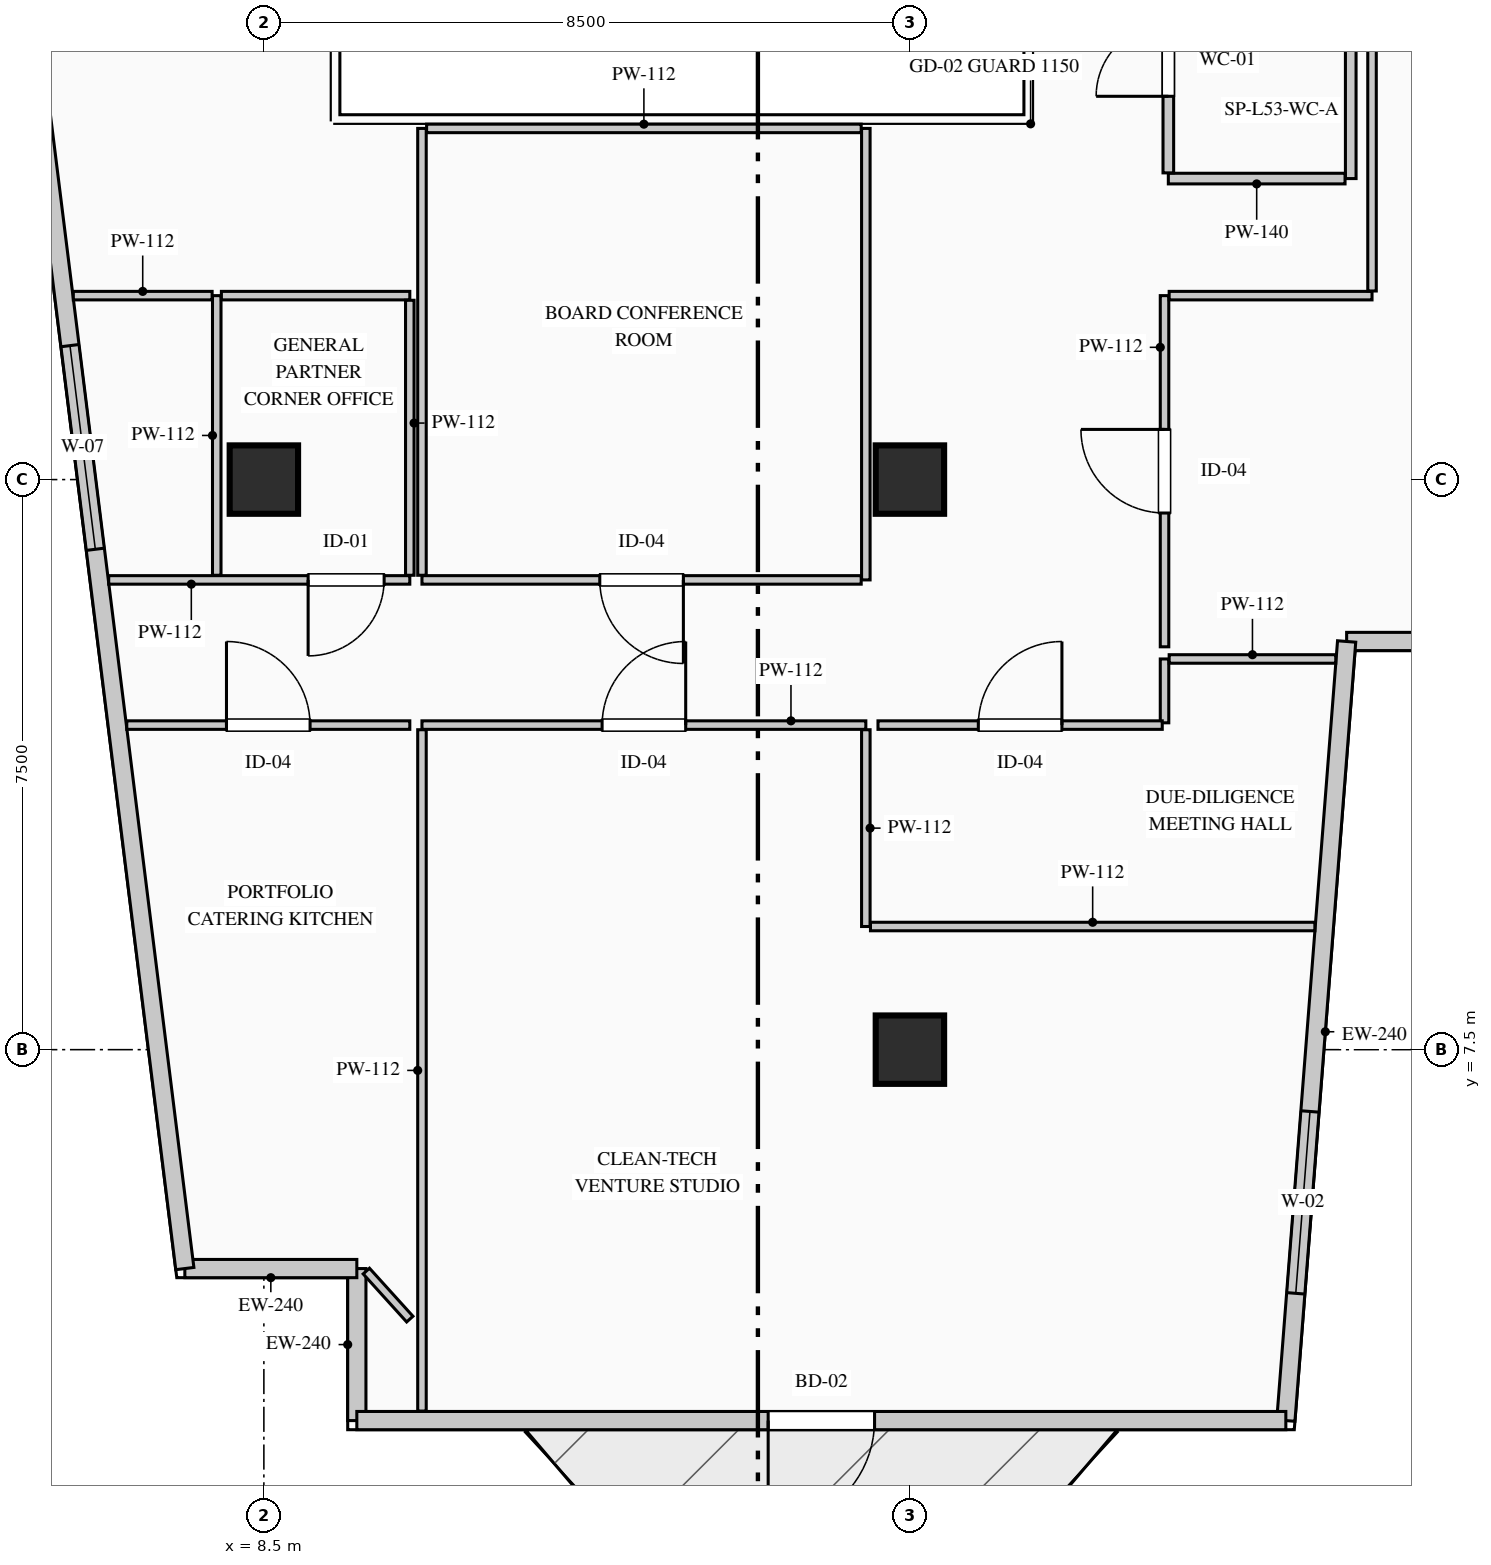
"""IFC4 building model, lengths in metres.
Left out: names, types, materials, properties, quantities, classifications, styles, units other than length and angle.
Written with IfcOpenShell. Run it as: python <this file> out.ifc"""

import sys

from ifc_helpers import new_model, si_unit, direction, frame, frame_2d, origin, origin_2d, place, context, subcontext, project, spatial, rectangle, extrude, element, fill, save


model = new_model("IFC4")
c1 = context("Model", 3, precision=1e-05, world=origin(), true_north=direction((0.0, 1.0)))
c2 = subcontext(c1, "Body", "Model", "MODEL_VIEW")
j1 = project(units=[si_unit("LENGTHUNIT", "METRE"), si_unit("PLANEANGLEUNIT", "RADIAN")], contexts=[c1])
p1 = place(None, origin())
s1 = spatial("IfcSite", under=j1, at=p1, CompositionType="ELEMENT")
p2 = place(p1, origin())
s2 = spatial("IfcBuilding", under=s1, at=p2, CompositionType="ELEMENT")
p3 = place(p2, frame((0.0, 0.0, 223.25)))
s3 = spatial("IfcBuildingStorey", under=s2, at=p3, CompositionType="ELEMENT", Elevation=223.25)
for number, where, z_axis, x_axis in (
    (1, (8.5, 15.0, 0.0), (0.0, 0.0, 1.0), (1.0, 0.0, 0.0)),
    (2, (17.0, 7.5, 0.0), (0.0, 0.0, 1.0), (1.0, 0.0, 0.0)),
    (3, (17.0, 15.0, 0.0), (0.0, 0.0, 1.0), (1.0, 0.0, 0.0)),
):
    element("IfcColumn", number, at=place(p3, frame(where, z_axis=z_axis, x_axis=x_axis)), inside=s3, PredefinedType="COLUMN", context=c2, shape_type="SweptSolid", body=[
        extrude(rectangle(XDim=0.9, YDim=0.9, at=origin_2d()), origin(), (0.0, 0.0, 1.0), 3.95),
    ])
p4 = place(p3, frame((9.723, 2.62, 0.0), z_axis=(0.0, 0.0, 1.0), x_axis=(0.0, 1.0, 0.0)))
e4 = element("IfcWall", 4, at=p4, inside=s3, PredefinedType="STANDARD", context=c2, shape_type="SweptSolid", body=[
    extrude(rectangle(XDim=2.0, YDim=0.24, at=frame_2d((1.0, 0.0))), origin(), (0.0, 0.0, 1.0), 3.7),
])
p5 = place(p3, frame((9.723, 4.62, 0.0), z_axis=(0.0, 0.0, 1.0), x_axis=(-1.0, 0.0, 0.0)))
e5 = element("IfcWall", 5, at=p5, inside=s3, PredefinedType="STANDARD", context=c2, shape_type="SweptSolid", body=[
    extrude(rectangle(XDim=2.263, YDim=0.24, at=frame_2d((1.131, 0.0))), origin(), (0.0, 0.0, 1.0), 3.7),
])
p6 = place(p3, frame((7.46, 4.62, 0.0), z_axis=(0.0, 0.0, 1.0), x_axis=(-0.123515576323, 0.992342633573, 0.0)))
e6 = element("IfcWall", 6, at=p6, inside=s3, PredefinedType="STANDARD", context=c2, shape_type="SweptSolid", body=[
    extrude(rectangle(XDim=37.043, YDim=0.24, at=frame_2d((18.522, 0.0))), origin(), (0.0, 0.0, 1.0), 3.7),
])
p7 = place(p6, frame((9.536, 0.0, 0.9)))
e7 = element("IfcOpeningElement", 7, at=p7, cuts=e6, PredefinedType="OPENING", context=c2, shape_type="SweptSolid", body=[
    extrude(rectangle(XDim=2.7, YDim=2.1, at=frame_2d((1.35, 1.05))), frame((0.0, 0.13, 0.0), z_axis=(0.0, -1.0, 0.0), x_axis=(1.0, 0.0, 0.0)), (0.0, 0.0, 1.0), 0.26),
])
p8 = place(p3, frame((29.581, 12.87, 0.0), z_axis=(0.0, 0.0, 1.0), x_axis=(-1.0, 0.0, 0.0)))
e8 = element("IfcWall", 8, at=p8, inside=s3, PredefinedType="STANDARD", context=c2, shape_type="SweptSolid", body=[
    extrude(rectangle(XDim=6.834, YDim=0.24, at=frame_2d((3.417, 0.0))), origin(), (0.0, 0.0, 1.0), 3.7),
])
p9 = place(p8, frame((1.26, 0.0, 0.9)))
e9 = element("IfcOpeningElement", 9, at=p9, cuts=e8, PredefinedType="OPENING", context=c2, shape_type="SweptSolid", body=[
    extrude(rectangle(XDim=2.4, YDim=2.1, at=frame_2d((1.2, 1.05))), frame((0.0, 0.13, 0.0), z_axis=(0.0, -1.0, 0.0), x_axis=(1.0, 0.0, 0.0)), (0.0, 0.0, 1.0), 0.26),
])
p10 = place(p3, frame((22.746, 12.87, 0.0), z_axis=(0.0, 0.0, 1.0), x_axis=(-0.077816860153, -0.996967670627, 0.0)))
e10 = element("IfcWall", 10, at=p10, inside=s3, PredefinedType="STANDARD", context=c2, shape_type="SweptSolid", body=[
    extrude(rectangle(XDim=10.281, YDim=0.24, at=frame_2d((5.141, 0.0))), origin(), (0.0, 0.0, 1.0), 3.7),
])
p11 = place(p10, frame((6.202, 0.0, 0.9)))
e11 = element("IfcOpeningElement", 11, at=p11, cuts=e10, PredefinedType="OPENING", context=c2, shape_type="SweptSolid", body=[
    extrude(rectangle(XDim=2.4, YDim=2.1, at=frame_2d((1.2, 1.05))), frame((0.0, 0.13, 0.0), z_axis=(0.0, -1.0, 0.0), x_axis=(1.0, 0.0, 0.0)), (0.0, 0.0, 1.0), 0.26),
])
p12 = place(p3, frame((21.946, 2.62, 0.0), z_axis=(0.0, 0.0, 1.0), x_axis=(-1.0, 0.0, 0.0)))
e12 = element("IfcWall", 12, at=p12, inside=s3, PredefinedType="STANDARD", context=c2, shape_type="SweptSolid", body=[
    extrude(rectangle(XDim=12.223, YDim=0.24, at=frame_2d((6.112, 0.0))), origin(), (0.0, 0.0, 1.0), 3.7),
])
p13 = place(p12, frame((5.411, 0.0, 0.0)))
e13 = element("IfcOpeningElement", 13, at=p13, cuts=e12, PredefinedType="OPENING", context=c2, shape_type="SweptSolid", body=[
    extrude(rectangle(XDim=1.4, YDim=2.2, at=frame_2d((0.7, 1.1))), frame((0.0, 0.13, 0.0), z_axis=(0.0, -1.0, 0.0), x_axis=(1.0, 0.0, 0.0)), (0.0, 0.0, 1.0), 0.26),
])
p14 = place(p3, frame((22.8, 22.0, 0.0), z_axis=(0.0, 0.0, 1.0), x_axis=(0.0, -1.0, 0.0)))
e14 = element("IfcWall", 14, at=p14, inside=s3, PredefinedType="PARTITIONING", context=c2, shape_type="SweptSolid", body=[
    extrude(rectangle(XDim=3.04, YDim=0.14, at=frame_2d((1.52, 0.0))), origin(), (0.0, 0.0, 1.0), 3.385),
])
p15 = place(p3, frame((22.725, 18.96, 0.0), z_axis=(0.0, 0.0, 1.0), x_axis=(-1.0, 0.0, 0.0)))
e15 = element("IfcWall", 15, at=p15, inside=s3, PredefinedType="PARTITIONING", context=c2, shape_type="SweptSolid", body=[
    extrude(rectangle(XDim=2.325, YDim=0.14, at=frame_2d((1.163, 0.0))), origin(), (0.0, 0.0, 1.0), 3.7),
])
p16 = place(p3, frame((20.4, 19.035, 0.0), z_axis=(0.0, 0.0, 1.0), x_axis=(0.0, 1.0, 0.0)))
e16 = element("IfcWall", 16, at=p16, inside=s3, PredefinedType="PARTITIONING", context=c2, shape_type="SweptSolid", body=[
    extrude(rectangle(XDim=2.965, YDim=0.14, at=frame_2d((1.482, 0.0))), origin(), (0.0, 0.0, 1.0), 3.7),
])
p17 = place(p16, frame((1.008, 0.0, 0.0)))
e17 = element("IfcOpeningElement", 17, at=p17, cuts=e16, PredefinedType="OPENING", context=c2, shape_type="SweptSolid", body=[
    extrude(rectangle(XDim=0.95, YDim=2.15, at=frame_2d((0.475, 1.075))), frame((0.0, 0.08, 0.0), z_axis=(0.0, -1.0, 0.0), x_axis=(1.0, 0.0, 0.0)), (0.0, 0.0, 1.0), 0.16),
])
p18 = place(p3, frame((10.58, 11.77, 0.0), z_axis=(0.0, 0.0, 1.0), x_axis=(1.0, 0.0, 0.0)))
e18 = element("IfcWall", 18, at=p18, inside=s3, PredefinedType="PARTITIONING", context=c2, shape_type="SweptSolid", body=[
    extrude(rectangle(XDim=5.84, YDim=0.112, at=frame_2d((2.92, 0.0))), origin(), (0.0, 0.0, 1.0), 3.7),
])
p19 = place(p18, frame((2.37, 0.0, 0.0)))
e19 = element("IfcOpeningElement", 19, at=p19, cuts=e18, PredefinedType="OPENING", context=c2, shape_type="SweptSolid", body=[
    extrude(rectangle(XDim=1.1, YDim=2.2, at=frame_2d((0.55, 1.1))), frame((0.0, 0.066, 0.0), z_axis=(0.0, -1.0, 0.0), x_axis=(1.0, 0.0, 0.0)), (0.0, 0.0, 1.0), 0.132),
])
p20 = place(p3, frame((16.42, 11.709, 0.0), z_axis=(0.0, 0.0, 1.0), x_axis=(0.0, -1.0, 0.0)))
e20 = element("IfcWall", 20, at=p20, inside=s3, PredefinedType="PARTITIONING", context=c2, shape_type="SweptSolid", body=[
    extrude(rectangle(XDim=2.589, YDim=0.112, at=frame_2d((1.294, 0.0))), origin(), (0.0, 0.0, 1.0), 3.7),
])
p21 = place(p3, frame((16.481, 9.12, 0.0), z_axis=(0.0, 0.0, 1.0), x_axis=(1.0, 0.0, 0.0)))
e21 = element("IfcWall", 21, at=p21, inside=s3, PredefinedType="PARTITIONING", context=c2, shape_type="SweptSolid", body=[
    extrude(rectangle(XDim=5.847, YDim=0.112, at=frame_2d((2.923, 0.0))), origin(), (0.0, 0.0, 1.0), 3.7),
])
p22 = place(p3, frame((10.58, 2.745, 0.0), z_axis=(0.0, 0.0, 1.0), x_axis=(0.0, 1.0, 0.0)))
e22 = element("IfcWall", 22, at=p22, inside=s3, PredefinedType="PARTITIONING", context=c2, shape_type="SweptSolid", body=[
    extrude(rectangle(XDim=8.964, YDim=0.112, at=frame_2d((4.482, 0.0))), origin(), (0.0, 0.0, 1.0), 3.7),
])
p23 = place(p3, frame((10.42, 3.955, 0.0), z_axis=(0.0, 0.0, 1.0), x_axis=(-0.671145806114, 0.741325371841, 0.0)))
e23 = element("IfcWall", 23, at=p23, inside=s3, PredefinedType="PARTITIONING", context=c2, shape_type="SweptSolid", body=[
    extrude(rectangle(XDim=0.852, YDim=0.112, at=frame_2d((0.426, 0.0))), origin(), (0.0, 0.0, 1.0), 3.7),
])
p24 = place(p3, frame((6.696, 11.77, 0.0), z_axis=(0.0, 0.0, 1.0), x_axis=(1.0, 0.0, 0.0)))
e24 = element("IfcWall", 24, at=p24, inside=s3, PredefinedType="PARTITIONING", context=c2, shape_type="SweptSolid", body=[
    extrude(rectangle(XDim=3.724, YDim=0.112, at=frame_2d((1.862, 0.0))), origin(), (0.0, 0.0, 1.0), 3.7),
])
p25 = place(p24, frame((1.312, 0.0, 0.0)))
e25 = element("IfcOpeningElement", 25, at=p25, cuts=e24, PredefinedType="OPENING", context=c2, shape_type="SweptSolid", body=[
    extrude(rectangle(XDim=1.1, YDim=2.2, at=frame_2d((0.55, 1.1))), frame((0.0, 0.066, 0.0), z_axis=(0.0, -1.0, 0.0), x_axis=(1.0, 0.0, 0.0)), (0.0, 0.0, 1.0), 0.132),
])
p26 = place(p3, frame((20.35, 11.8, 0.0), z_axis=(0.0, 0.0, 1.0), x_axis=(0.0, 1.0, 0.0)))
e26 = element("IfcWall", 26, at=p26, inside=s3, PredefinedType="PARTITIONING", context=c2, shape_type="SweptSolid", body=[
    extrude(rectangle(XDim=0.84, YDim=0.112, at=frame_2d((0.42, 0.0))), origin(), (0.0, 0.0, 1.0), 3.7),
])
p27 = place(p3, frame((20.411, 12.64, 0.0), z_axis=(0.0, 0.0, 1.0), x_axis=(1.0, 0.0, 0.0)))
e27 = element("IfcWall", 27, at=p27, inside=s3, PredefinedType="PARTITIONING", context=c2, shape_type="SweptSolid", body=[
    extrude(rectangle(XDim=2.192, YDim=0.112, at=frame_2d((1.096, 0.0))), origin(), (0.0, 0.0, 1.0), 3.7),
])
p28 = place(p3, frame((16.58, 11.77, 0.0), z_axis=(0.0, 0.0, 1.0), x_axis=(1.0, 0.0, 0.0)))
e28 = element("IfcWall", 28, at=p28, inside=s3, PredefinedType="PARTITIONING", context=c2, shape_type="SweptSolid", body=[
    extrude(rectangle(XDim=3.74, YDim=0.112, at=frame_2d((1.87, 0.0))), origin(), (0.0, 0.0, 1.0), 3.7),
])
p29 = place(p28, frame((1.32, 0.0, 0.0)))
e29 = element("IfcOpeningElement", 29, at=p29, cuts=e28, PredefinedType="OPENING", context=c2, shape_type="SweptSolid", body=[
    extrude(rectangle(XDim=1.1, YDim=2.2, at=frame_2d((0.55, 1.1))), frame((0.0, 0.066, 0.0), z_axis=(0.0, -1.0, 0.0), x_axis=(1.0, 0.0, 0.0)), (0.0, 0.0, 1.0), 0.132),
])
p30 = place(p3, frame((10.42, 13.68, 0.0), z_axis=(0.0, 0.0, 1.0), x_axis=(-1.0, 0.0, 0.0)))
e30 = element("IfcWall", 30, at=p30, inside=s3, PredefinedType="PARTITIONING", context=c2, shape_type="SweptSolid", body=[
    extrude(rectangle(XDim=3.961, YDim=0.112, at=frame_2d((1.981, 0.0))), origin(), (0.0, 0.0, 1.0), 3.7),
])
p31 = place(p30, frame((0.338, 0.0, 0.0)))
e31 = element("IfcOpeningElement", 31, at=p31, cuts=e30, PredefinedType="OPENING", context=c2, shape_type="SweptSolid", body=[
    extrude(rectangle(XDim=1.0, YDim=2.15, at=frame_2d((0.5, 1.075))), frame((0.0, 0.066, 0.0), z_axis=(0.0, -1.0, 0.0), x_axis=(1.0, 0.0, 0.0)), (0.0, 0.0, 1.0), 0.132),
])
p32 = place(p3, frame((7.88, 13.741, 0.0), z_axis=(0.0, 0.0, 1.0), x_axis=(0.0, 1.0, 0.0)))
e32 = element("IfcWall", 32, at=p32, inside=s3, PredefinedType="PARTITIONING", context=c2, shape_type="SweptSolid", body=[
    extrude(rectangle(XDim=3.679, YDim=0.112, at=frame_2d((1.839, 0.0))), origin(), (0.0, 0.0, 1.0), 3.7),
])
p33 = place(p3, frame((5.993, 17.42, 0.0), z_axis=(0.0, 0.0, 1.0), x_axis=(1.0, 0.0, 0.0)))
e33 = element("IfcWall", 33, at=p33, inside=s3, PredefinedType="PARTITIONING", context=c2, shape_type="SweptSolid", body=[
    extrude(rectangle(XDim=1.826, YDim=0.112, at=frame_2d((0.913, 0.0))), origin(), (0.0, 0.0, 1.0), 3.7),
])
p34 = place(p3, frame((7.941, 17.42, 0.0), z_axis=(0.0, 0.0, 1.0), x_axis=(1.0, 0.0, 0.0)))
e34 = element("IfcWall", 34, at=p34, inside=s3, PredefinedType="PARTITIONING", context=c2, shape_type="SweptSolid", body=[
    extrude(rectangle(XDim=2.479, YDim=0.112, at=frame_2d((1.24, 0.0))), origin(), (0.0, 0.0, 1.0), 3.7),
])
p35 = place(p3, frame((10.42, 17.359, 0.0), z_axis=(0.0, 0.0, 1.0), x_axis=(0.0, -1.0, 0.0)))
e35 = element("IfcWall", 35, at=p35, inside=s3, PredefinedType="PARTITIONING", context=c2, shape_type="SweptSolid", body=[
    extrude(rectangle(XDim=3.618, YDim=0.112, at=frame_2d((1.809, 0.0))), origin(), (0.0, 0.0, 1.0), 3.7),
])
p36 = place(p3, frame((16.42, 19.62, 0.0), z_axis=(0.0, 0.0, 1.0), x_axis=(0.0, -1.0, 0.0)))
e36 = element("IfcWall", 36, at=p36, inside=s3, PredefinedType="PARTITIONING", context=c2, shape_type="SweptSolid", body=[
    extrude(rectangle(XDim=5.94, YDim=0.112, at=frame_2d((2.97, 0.0))), origin(), (0.0, 0.0, 1.0), 3.7),
])
p37 = place(p3, frame((16.359, 13.68, 0.0), z_axis=(0.0, 0.0, 1.0), x_axis=(-1.0, 0.0, 0.0)))
e37 = element("IfcWall", 37, at=p37, inside=s3, PredefinedType="PARTITIONING", context=c2, shape_type="SweptSolid", body=[
    extrude(rectangle(XDim=5.779, YDim=0.112, at=frame_2d((2.889, 0.0))), origin(), (0.0, 0.0, 1.0), 3.7),
])
p38 = place(p37, frame((2.34, 0.0, 0.0)))
e38 = element("IfcOpeningElement", 38, at=p38, cuts=e37, PredefinedType="OPENING", context=c2, shape_type="SweptSolid", body=[
    extrude(rectangle(XDim=1.1, YDim=2.2, at=frame_2d((0.55, 1.1))), frame((0.0, 0.066, 0.0), z_axis=(0.0, -1.0, 0.0), x_axis=(1.0, 0.0, 0.0)), (0.0, 0.0, 1.0), 0.132),
])
p39 = place(p3, frame((10.58, 13.741, 0.0), z_axis=(0.0, 0.0, 1.0), x_axis=(0.0, 1.0, 0.0)))
e39 = element("IfcWall", 39, at=p39, inside=s3, PredefinedType="PARTITIONING", context=c2, shape_type="SweptSolid", body=[
    extrude(rectangle(XDim=5.879, YDim=0.112, at=frame_2d((2.939, 0.0))), origin(), (0.0, 0.0, 1.0), 3.7),
])
p40 = place(p3, frame((10.641, 19.62, 0.0), z_axis=(0.0, 0.0, 1.0), x_axis=(1.0, 0.0, 0.0)))
e40 = element("IfcWall", 40, at=p40, inside=s3, PredefinedType="PARTITIONING", context=c2, shape_type="SweptSolid", body=[
    extrude(rectangle(XDim=5.718, YDim=0.112, at=frame_2d((2.859, 0.0))), origin(), (0.0, 0.0, 1.0), 3.7),
])
p41 = place(p3, frame((20.35, 12.8, 0.0), z_axis=(0.0, 0.0, 1.0), x_axis=(0.0, 1.0, 0.0)))
e41 = element("IfcWall", 41, at=p41, inside=s3, PredefinedType="PARTITIONING", context=c2, shape_type="SweptSolid", body=[
    extrude(rectangle(XDim=4.62, YDim=0.112, at=frame_2d((2.31, 0.0))), origin(), (0.0, 0.0, 1.0), 3.7),
])
p42 = place(p41, frame((1.76, 0.0, 0.0)))
e42 = element("IfcOpeningElement", 42, at=p42, cuts=e41, PredefinedType="OPENING", context=c2, shape_type="SweptSolid", body=[
    extrude(rectangle(XDim=1.1, YDim=2.2, at=frame_2d((0.55, 1.1))), frame((0.0, 0.066, 0.0), z_axis=(0.0, -1.0, 0.0), x_axis=(1.0, 0.0, 0.0)), (0.0, 0.0, 1.0), 0.132),
])
p43 = place(p3, frame((20.411, 17.42, 0.0), z_axis=(0.0, 0.0, 1.0), x_axis=(1.0, 0.0, 0.0)))
e43 = element("IfcWall", 43, at=p43, inside=s3, PredefinedType="PARTITIONING", context=c2, shape_type="SweptSolid", body=[
    extrude(rectangle(XDim=2.669, YDim=0.112, at=frame_2d((1.334, 0.0))), origin(), (0.0, 0.0, 1.0), 3.7),
])
p44 = place(p3, frame((23.08, 17.481, 0.0), z_axis=(0.0, 0.0, 1.0), x_axis=(0.0, 1.0, 0.0)))
e44 = element("IfcWall", 44, at=p44, inside=s3, PredefinedType="PARTITIONING", context=c2, shape_type="SweptSolid", body=[
    extrude(rectangle(XDim=6.939, YDim=0.112, at=frame_2d((3.469, 0.0))), origin(), (0.0, 0.0, 1.0), 3.385),
])
p45 = place(p7, origin())
e45 = element("IfcWindow", 45, at=p45, inside=s3, PartitioningType="DOUBLE_PANEL_VERTICAL", PredefinedType="WINDOW", context=c2, shape_type="SweptSolid", body=[
    extrude(rectangle(XDim=2.7, YDim=2.1, at=frame_2d((1.35, 1.05))), frame((0.0, 0.03, 0.0), z_axis=(0.0, -1.0, 0.0), x_axis=(1.0, 0.0, 0.0)), (0.0, 0.0, 1.0), 0.06),
])
fill(e7, e45)
p46 = place(p11, origin())
e46 = element("IfcWindow", 46, at=p46, inside=s3, PartitioningType="DOUBLE_PANEL_VERTICAL", PredefinedType="WINDOW", context=c2, shape_type="SweptSolid", body=[
    extrude(rectangle(XDim=2.4, YDim=2.1, at=frame_2d((1.2, 1.05))), frame((0.0, 0.03, 0.0), z_axis=(0.0, -1.0, 0.0), x_axis=(1.0, 0.0, 0.0)), (0.0, 0.0, 1.0), 0.06),
])
fill(e11, e46)
p47 = place(p13, origin())
e47 = element("IfcDoor", 47, at=p47, inside=s3, OperationType="SINGLE_SWING_RIGHT", PredefinedType="DOOR", context=c2, shape_type="SweptSolid", body=[
    extrude(rectangle(XDim=1.4, YDim=2.2, at=frame_2d((0.7, 1.1))), frame((0.0, 0.025, 0.0), z_axis=(0.0, -1.0, 0.0), x_axis=(1.0, 0.0, 0.0)), (0.0, 0.0, 1.0), 0.05),
])
fill(e13, e47)
p48 = place(p17, origin())
e48 = element("IfcDoor", 48, at=p48, inside=s3, OperationType="SINGLE_SWING_LEFT", PredefinedType="DOOR", context=c2, shape_type="SweptSolid", body=[
    extrude(rectangle(XDim=0.95, YDim=2.15, at=frame_2d((0.475, 1.075))), frame((0.0, 0.025, 0.0), z_axis=(0.0, -1.0, 0.0), x_axis=(1.0, 0.0, 0.0)), (0.0, 0.0, 1.0), 0.05),
])
fill(e17, e48)
p49 = place(p19, origin())
e49 = element("IfcDoor", 49, at=p49, inside=s3, OperationType="SINGLE_SWING_RIGHT", PredefinedType="DOOR", context=c2, shape_type="SweptSolid", body=[
    extrude(rectangle(XDim=1.1, YDim=2.2, at=frame_2d((0.55, 1.1))), frame((0.0, 0.025, 0.0), z_axis=(0.0, -1.0, 0.0), x_axis=(1.0, 0.0, 0.0)), (0.0, 0.0, 1.0), 0.05),
])
fill(e19, e49)
p50 = place(p25, origin())
e50 = element("IfcDoor", 50, at=p50, inside=s3, OperationType="SINGLE_SWING_LEFT", PredefinedType="DOOR", context=c2, shape_type="SweptSolid", body=[
    extrude(rectangle(XDim=1.1, YDim=2.2, at=frame_2d((0.55, 1.1))), frame((0.0, 0.025, 0.0), z_axis=(0.0, -1.0, 0.0), x_axis=(1.0, 0.0, 0.0)), (0.0, 0.0, 1.0), 0.05),
])
fill(e25, e50)
p51 = place(p29, origin())
e51 = element("IfcDoor", 51, at=p51, inside=s3, OperationType="SINGLE_SWING_RIGHT", PredefinedType="DOOR", context=c2, shape_type="SweptSolid", body=[
    extrude(rectangle(XDim=1.1, YDim=2.2, at=frame_2d((0.55, 1.1))), frame((0.0, 0.025, 0.0), z_axis=(0.0, -1.0, 0.0), x_axis=(1.0, 0.0, 0.0)), (0.0, 0.0, 1.0), 0.05),
])
fill(e29, e51)
p52 = place(p31, origin())
e52 = element("IfcDoor", 52, at=p52, inside=s3, OperationType="SINGLE_SWING_RIGHT", PredefinedType="DOOR", context=c2, shape_type="SweptSolid", body=[
    extrude(rectangle(XDim=1.0, YDim=2.15, at=frame_2d((0.5, 1.075))), frame((0.0, 0.025, 0.0), z_axis=(0.0, -1.0, 0.0), x_axis=(1.0, 0.0, 0.0)), (0.0, 0.0, 1.0), 0.05),
])
fill(e31, e52)
p53 = place(p38, origin())
e53 = element("IfcDoor", 53, at=p53, inside=s3, OperationType="SINGLE_SWING_LEFT", PredefinedType="DOOR", context=c2, shape_type="SweptSolid", body=[
    extrude(rectangle(XDim=1.1, YDim=2.2, at=frame_2d((0.55, 1.1))), frame((0.0, 0.025, 0.0), z_axis=(0.0, -1.0, 0.0), x_axis=(1.0, 0.0, 0.0)), (0.0, 0.0, 1.0), 0.05),
])
fill(e38, e53)
p54 = place(p42, origin())
e54 = element("IfcDoor", 54, at=p54, inside=s3, OperationType="SINGLE_SWING_RIGHT", PredefinedType="DOOR", context=c2, shape_type="SweptSolid", body=[
    extrude(rectangle(XDim=1.1, YDim=2.2, at=frame_2d((0.55, 1.1))), frame((0.0, 0.025, 0.0), z_axis=(0.0, -1.0, 0.0), x_axis=(1.0, 0.0, 0.0)), (0.0, 0.0, 1.0), 0.05),
])
fill(e42, e54)
save(model, sys.argv[1])
